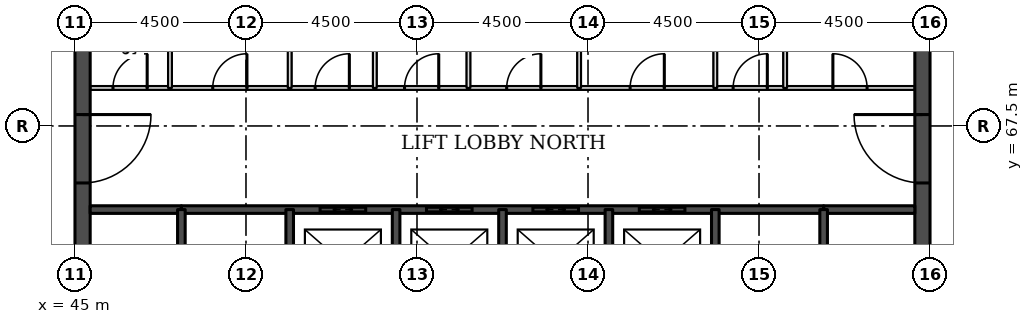
"""IFC4 building model, lengths in metres.
Left out: names, types, materials, properties, quantities, classifications, styles, units other than length and angle.
Written with IfcOpenShell. Run it as: python <this file> out.ifc"""

import sys

from ifc_helpers import new_model, si_unit, direction, frame, frame_2d, origin, place, context, subcontext, project, spatial, rectangle, extrude, element, fill, save


model = new_model("IFC4")
c1 = context("Model", 3, precision=1e-05, world=origin(), true_north=direction((0.0, 1.0)))
c2 = subcontext(c1, "Body", "Model", "MODEL_VIEW")
j1 = project(units=[si_unit("LENGTHUNIT", "METRE"), si_unit("PLANEANGLEUNIT", "RADIAN")], contexts=[c1])
p1 = place(None, origin())
s1 = spatial("IfcSite", under=j1, at=p1, CompositionType="ELEMENT")
p2 = place(p1, origin())
s2 = spatial("IfcBuilding", under=s1, at=p2, CompositionType="ELEMENT")
p3 = place(p2, frame((0.0, 0.0, 166.2)))
s3 = spatial("IfcBuildingStorey", under=s2, at=p3, CompositionType="ELEMENT", Elevation=166.2)
p4 = place(p3, frame((45.2, 49.5, 0.0), z_axis=(0.0, 0.0, 1.0), x_axis=(0.0, 1.0, 0.0)))
e1 = element("IfcWall", 1, at=p4, inside=s3, PredefinedType="SHEAR", context=c2, shape_type="SweptSolid", body=[
    extrude(rectangle(XDim=22.5, YDim=0.4, at=frame_2d((11.25, 0.0))), origin(), (0.0, 0.0, 1.0), 3.7),
])
p5 = place(p4, frame((4.2, 0.0, 0.0)))
e2 = element("IfcOpeningElement", 2, at=p5, cuts=e1, PredefinedType="OPENING", context=c2, shape_type="SweptSolid", body=[
    extrude(rectangle(XDim=1.8, YDim=2.1, at=frame_2d((0.9, 1.05))), frame((0.0, 0.21, 0.0), z_axis=(0.0, -1.0, 0.0), x_axis=(1.0, 0.0, 0.0)), (0.0, 0.0, 1.0), 0.42),
])
p6 = place(p4, frame((6.9, 0.0, 0.0)))
e3 = element("IfcOpeningElement", 3, at=p6, cuts=e1, PredefinedType="OPENING", context=c2, shape_type="SweptSolid", body=[
    extrude(rectangle(XDim=1.1, YDim=2.1, at=frame_2d((0.55, 1.05))), frame((0.0, 0.21, 0.0), z_axis=(0.0, -1.0, 0.0), x_axis=(1.0, 0.0, 0.0)), (0.0, 0.0, 1.0), 0.42),
])
p7 = place(p4, frame((13.6, 0.0, 0.0)))
e4 = element("IfcOpeningElement", 4, at=p7, cuts=e1, PredefinedType="OPENING", context=c2, shape_type="SweptSolid", body=[
    extrude(rectangle(XDim=1.1, YDim=2.1, at=frame_2d((0.55, 1.05))), frame((0.0, 0.21, 0.0), z_axis=(0.0, -1.0, 0.0), x_axis=(1.0, 0.0, 0.0)), (0.0, 0.0, 1.0), 0.42),
])
p8 = place(p4, frame((16.5, 0.0, 0.0)))
e5 = element("IfcOpeningElement", 5, at=p8, cuts=e1, PredefinedType="OPENING", context=c2, shape_type="SweptSolid", body=[
    extrude(rectangle(XDim=1.8, YDim=2.1, at=frame_2d((0.9, 1.05))), frame((0.0, 0.21, 0.0), z_axis=(0.0, -1.0, 0.0), x_axis=(1.0, 0.0, 0.0)), (0.0, 0.0, 1.0), 0.42),
])
p9 = place(p3, frame((67.3, 49.5, 0.0), z_axis=(0.0, 0.0, 1.0), x_axis=(0.0, 1.0, 0.0)))
e6 = element("IfcWall", 6, at=p9, inside=s3, PredefinedType="SHEAR", context=c2, shape_type="SweptSolid", body=[
    extrude(rectangle(XDim=22.5, YDim=0.4, at=frame_2d((11.25, 0.0))), origin(), (0.0, 0.0, 1.0), 3.7),
])
p10 = place(p9, frame((4.2, 0.0, 0.0)))
e7 = element("IfcOpeningElement", 7, at=p10, cuts=e6, PredefinedType="OPENING", context=c2, shape_type="SweptSolid", body=[
    extrude(rectangle(XDim=1.8, YDim=2.1, at=frame_2d((0.9, 1.05))), frame((0.0, 0.21, 0.0), z_axis=(0.0, -1.0, 0.0), x_axis=(1.0, 0.0, 0.0)), (0.0, 0.0, 1.0), 0.42),
])
p11 = place(p9, frame((6.9, 0.0, 0.0)))
e8 = element("IfcOpeningElement", 8, at=p11, cuts=e6, PredefinedType="OPENING", context=c2, shape_type="SweptSolid", body=[
    extrude(rectangle(XDim=1.1, YDim=2.1, at=frame_2d((0.55, 1.05))), frame((0.0, 0.21, 0.0), z_axis=(0.0, -1.0, 0.0), x_axis=(1.0, 0.0, 0.0)), (0.0, 0.0, 1.0), 0.42),
])
p12 = place(p9, frame((13.6, 0.0, 0.0)))
e9 = element("IfcOpeningElement", 9, at=p12, cuts=e6, PredefinedType="OPENING", context=c2, shape_type="SweptSolid", body=[
    extrude(rectangle(XDim=1.1, YDim=2.1, at=frame_2d((0.55, 1.05))), frame((0.0, 0.21, 0.0), z_axis=(0.0, -1.0, 0.0), x_axis=(1.0, 0.0, 0.0)), (0.0, 0.0, 1.0), 0.42),
])
p13 = place(p9, frame((16.5, 0.0, 0.0)))
e10 = element("IfcOpeningElement", 10, at=p13, cuts=e6, PredefinedType="OPENING", context=c2, shape_type="SweptSolid", body=[
    extrude(rectangle(XDim=1.8, YDim=2.1, at=frame_2d((0.9, 1.05))), frame((0.0, 0.21, 0.0), z_axis=(0.0, -1.0, 0.0), x_axis=(1.0, 0.0, 0.0)), (0.0, 0.0, 1.0), 0.42),
])
for number, where, z_axis, x_axis in (
    (11, (45.4, 65.3, 0.0), (0.0, 0.0, 1.0), (1.0, 0.0, 0.0)),
    (12, (64.7, 65.3, 0.0), (0.0, 0.0, 1.0), (1.0, 0.0, 0.0)),
):
    element("IfcWall", number, at=place(p3, frame(where, z_axis=z_axis, x_axis=x_axis)), inside=s3, PredefinedType="SOLIDWALL", context=c2, shape_type="SweptSolid", body=[
        extrude(rectangle(XDim=2.4, YDim=0.2, at=frame_2d((1.2, 0.0))), origin(), (0.0, 0.0, 1.0), 3.55),
    ])
p14 = place(p3, frame((47.8, 65.3, 0.0), z_axis=(0.0, 0.0, 1.0), x_axis=(1.0, 0.0, 0.0)))
e13 = element("IfcWall", 13, at=p14, inside=s3, PredefinedType="SOLIDWALL", context=c2, shape_type="SweptSolid", body=[
    extrude(rectangle(XDim=16.9, YDim=0.2, at=frame_2d((8.45, 0.0))), origin(), (0.0, 0.0, 1.0), 3.55),
])
p15 = place(p14, frame((3.65, 0.0, 0.0)))
e14 = element("IfcOpeningElement", 14, at=p15, cuts=e13, PredefinedType="OPENING", context=c2, shape_type="SweptSolid", body=[
    extrude(rectangle(XDim=1.2, YDim=2.1, at=frame_2d((0.6, 1.05))), frame((0.0, 0.11, 0.0), z_axis=(0.0, -1.0, 0.0), x_axis=(1.0, 0.0, 0.0)), (0.0, 0.0, 1.0), 0.22),
])
p16 = place(p14, frame((6.45, 0.0, 0.0)))
e15 = element("IfcOpeningElement", 15, at=p16, cuts=e13, PredefinedType="OPENING", context=c2, shape_type="SweptSolid", body=[
    extrude(rectangle(XDim=1.2, YDim=2.1, at=frame_2d((0.6, 1.05))), frame((0.0, 0.11, 0.0), z_axis=(0.0, -1.0, 0.0), x_axis=(1.0, 0.0, 0.0)), (0.0, 0.0, 1.0), 0.22),
])
p17 = place(p14, frame((9.25, 0.0, 0.0)))
e16 = element("IfcOpeningElement", 16, at=p17, cuts=e13, PredefinedType="OPENING", context=c2, shape_type="SweptSolid", body=[
    extrude(rectangle(XDim=1.2, YDim=2.1, at=frame_2d((0.6, 1.05))), frame((0.0, 0.11, 0.0), z_axis=(0.0, -1.0, 0.0), x_axis=(1.0, 0.0, 0.0)), (0.0, 0.0, 1.0), 0.22),
])
p18 = place(p14, frame((12.05, 0.0, 0.0)))
e17 = element("IfcOpeningElement", 17, at=p18, cuts=e13, PredefinedType="OPENING", context=c2, shape_type="SweptSolid", body=[
    extrude(rectangle(XDim=1.2, YDim=2.1, at=frame_2d((0.6, 1.05))), frame((0.0, 0.11, 0.0), z_axis=(0.0, -1.0, 0.0), x_axis=(1.0, 0.0, 0.0)), (0.0, 0.0, 1.0), 0.22),
])
p19 = place(p3, frame((45.4, 68.5, 0.0), z_axis=(0.0, 0.0, 1.0), x_axis=(1.0, 0.0, 0.0)))
e18 = element("IfcWall", 18, at=p19, inside=s3, PredefinedType="PARTITIONING", context=c2, shape_type="SweptSolid", body=[
    extrude(rectangle(XDim=21.7, YDim=0.1, at=frame_2d((10.85, 0.0))), origin(), (0.0, 0.0, 1.0), 3.55),
])
p20 = place(p19, frame((19.544, 0.0, 0.0)))
e19 = element("IfcOpeningElement", 19, at=p20, cuts=e18, PredefinedType="OPENING", context=c2, shape_type="SweptSolid", body=[
    extrude(rectangle(XDim=0.9, YDim=2.1, at=frame_2d((0.45, 1.05))), frame((0.0, 0.06, 0.0), z_axis=(0.0, -1.0, 0.0), x_axis=(1.0, 0.0, 0.0)), (0.0, 0.0, 1.0), 0.12),
])
p21 = place(p19, frame((16.919, 0.0, 0.0)))
e20 = element("IfcOpeningElement", 20, at=p21, cuts=e18, PredefinedType="OPENING", context=c2, shape_type="SweptSolid", body=[
    extrude(rectangle(XDim=0.9, YDim=2.1, at=frame_2d((0.45, 1.05))), frame((0.0, 0.06, 0.0), z_axis=(0.0, -1.0, 0.0), x_axis=(1.0, 0.0, 0.0)), (0.0, 0.0, 1.0), 0.12),
])
p22 = place(p19, frame((0.6, 0.0, 0.0)))
e21 = element("IfcOpeningElement", 21, at=p22, cuts=e18, PredefinedType="OPENING", context=c2, shape_type="SweptSolid", body=[
    extrude(rectangle(XDim=0.9, YDim=2.1, at=frame_2d((0.45, 1.05))), frame((0.0, 0.06, 0.0), z_axis=(0.0, -1.0, 0.0), x_axis=(1.0, 0.0, 0.0)), (0.0, 0.0, 1.0), 0.12),
])
p23 = place(p19, frame((3.225, 0.0, 0.0)))
e22 = element("IfcOpeningElement", 22, at=p23, cuts=e18, PredefinedType="OPENING", context=c2, shape_type="SweptSolid", body=[
    extrude(rectangle(XDim=0.9, YDim=2.1, at=frame_2d((0.45, 1.05))), frame((0.0, 0.06, 0.0), z_axis=(0.0, -1.0, 0.0), x_axis=(1.0, 0.0, 0.0)), (0.0, 0.0, 1.0), 0.12),
])
p24 = place(p19, frame((14.208, 0.0, 0.0)))
e23 = element("IfcOpeningElement", 23, at=p24, cuts=e18, PredefinedType="OPENING", context=c2, shape_type="SweptSolid", body=[
    extrude(rectangle(XDim=0.9, YDim=2.1, at=frame_2d((0.45, 1.05))), frame((0.0, 0.06, 0.0), z_axis=(0.0, -1.0, 0.0), x_axis=(1.0, 0.0, 0.0)), (0.0, 0.0, 1.0), 0.12),
])
p25 = place(p19, frame((10.96, 0.0, 0.0)))
e24 = element("IfcOpeningElement", 24, at=p25, cuts=e18, PredefinedType="OPENING", context=c2, shape_type="SweptSolid", body=[
    extrude(rectangle(XDim=0.9, YDim=2.1, at=frame_2d((0.45, 1.05))), frame((0.0, 0.06, 0.0), z_axis=(0.0, -1.0, 0.0), x_axis=(1.0, 0.0, 0.0)), (0.0, 0.0, 1.0), 0.12),
])
p26 = place(p19, frame((8.272, 0.0, 0.0)))
e25 = element("IfcOpeningElement", 25, at=p26, cuts=e18, PredefinedType="OPENING", context=c2, shape_type="SweptSolid", body=[
    extrude(rectangle(XDim=0.9, YDim=2.1, at=frame_2d((0.45, 1.05))), frame((0.0, 0.06, 0.0), z_axis=(0.0, -1.0, 0.0), x_axis=(1.0, 0.0, 0.0)), (0.0, 0.0, 1.0), 0.12),
])
p27 = place(p19, frame((5.92, 0.0, 0.0)))
e26 = element("IfcOpeningElement", 26, at=p27, cuts=e18, PredefinedType="OPENING", context=c2, shape_type="SweptSolid", body=[
    extrude(rectangle(XDim=0.9, YDim=2.1, at=frame_2d((0.45, 1.05))), frame((0.0, 0.06, 0.0), z_axis=(0.0, -1.0, 0.0), x_axis=(1.0, 0.0, 0.0)), (0.0, 0.0, 1.0), 0.12),
])
p28 = place(p3, frame((47.5, 68.5, 0.0), z_axis=(0.0, 0.0, 1.0), x_axis=(0.0, 1.0, 0.0)))
e27 = element("IfcWall", 27, at=p28, inside=s3, PredefinedType="PARTITIONING", context=c2, shape_type="SweptSolid", body=[
    extrude(rectangle(XDim=3.1, YDim=0.1, at=frame_2d((1.55, 0.0))), origin(), (0.0, 0.0, 1.0), 3.55),
])
p29 = place(p3, frame((47.8, 62.0, 0.0), z_axis=(0.0, 0.0, 1.0), x_axis=(0.0, 1.0, 0.0)))
e28 = element("IfcWall", 28, at=p29, inside=s3, PredefinedType="SOLIDWALL", context=c2, shape_type="SweptSolid", body=[
    extrude(rectangle(XDim=3.3, YDim=0.2, at=frame_2d((1.65, 0.0))), origin(), (0.0, 0.0, 1.0), 3.55),
])
p30 = place(p29, frame((1.1, 0.0, 0.0)))
e29 = element("IfcOpeningElement", 29, at=p30, cuts=e28, PredefinedType="OPENING", context=c2, shape_type="SweptSolid", body=[
    extrude(rectangle(XDim=1.1, YDim=2.1, at=frame_2d((0.55, 1.05))), frame((0.0, 0.11, 0.0), z_axis=(0.0, -1.0, 0.0), x_axis=(1.0, 0.0, 0.0)), (0.0, 0.0, 1.0), 0.22),
])
p31 = place(p3, frame((50.65, 68.5, 0.0), z_axis=(0.0, 0.0, 1.0), x_axis=(0.0, 1.0, 0.0)))
e30 = element("IfcWall", 30, at=p31, inside=s3, PredefinedType="PARTITIONING", context=c2, shape_type="SweptSolid", body=[
    extrude(rectangle(XDim=3.1, YDim=0.1, at=frame_2d((1.55, 0.0))), origin(), (0.0, 0.0, 1.0), 3.55),
])
p32 = place(p3, frame((50.65, 62.0, 0.0), z_axis=(0.0, 0.0, 1.0), x_axis=(0.0, 1.0, 0.0)))
e31 = element("IfcWall", 31, at=p32, inside=s3, PredefinedType="SOLIDWALL", context=c2, shape_type="SweptSolid", body=[
    extrude(rectangle(XDim=3.3, YDim=0.2, at=frame_2d((1.65, 0.0))), origin(), (0.0, 0.0, 1.0), 3.55),
])
p33 = place(p3, frame((52.89, 68.5, 0.0), z_axis=(0.0, 0.0, 1.0), x_axis=(0.0, 1.0, 0.0)))
e32 = element("IfcWall", 32, at=p33, inside=s3, PredefinedType="PARTITIONING", context=c2, shape_type="SweptSolid", body=[
    extrude(rectangle(XDim=3.1, YDim=0.1, at=frame_2d((1.55, 0.0))), origin(), (0.0, 0.0, 1.0), 3.55),
])
p34 = place(p3, frame((53.45, 62.5, 0.0), z_axis=(0.0, 0.0, 1.0), x_axis=(0.0, 1.0, 0.0)))
e33 = element("IfcWall", 33, at=p34, inside=s3, PredefinedType="SOLIDWALL", context=c2, shape_type="SweptSolid", body=[
    extrude(rectangle(XDim=2.8, YDim=0.2, at=frame_2d((1.4, 0.0))), origin(), (0.0, 0.0, 1.0), 3.55),
])
p35 = place(p3, frame((55.354, 68.5, 0.0), z_axis=(0.0, 0.0, 1.0), x_axis=(0.0, 1.0, 0.0)))
e34 = element("IfcWall", 34, at=p35, inside=s3, PredefinedType="PARTITIONING", context=c2, shape_type="SweptSolid", body=[
    extrude(rectangle(XDim=3.1, YDim=0.1, at=frame_2d((1.55, 0.0))), origin(), (0.0, 0.0, 1.0), 3.55),
])
p36 = place(p3, frame((56.25, 62.5, 0.0), z_axis=(0.0, 0.0, 1.0), x_axis=(0.0, 1.0, 0.0)))
e35 = element("IfcWall", 35, at=p36, inside=s3, PredefinedType="SOLIDWALL", context=c2, shape_type="SweptSolid", body=[
    extrude(rectangle(XDim=2.8, YDim=0.2, at=frame_2d((1.4, 0.0))), origin(), (0.0, 0.0, 1.0), 3.55),
])
p37 = place(p3, frame((58.266, 68.5, 0.0), z_axis=(0.0, 0.0, 1.0), x_axis=(0.0, 1.0, 0.0)))
e36 = element("IfcWall", 36, at=p37, inside=s3, PredefinedType="PARTITIONING", context=c2, shape_type="SweptSolid", body=[
    extrude(rectangle(XDim=3.1, YDim=0.1, at=frame_2d((1.55, 0.0))), origin(), (0.0, 0.0, 1.0), 3.55),
])
p38 = place(p3, frame((59.05, 62.5, 0.0), z_axis=(0.0, 0.0, 1.0), x_axis=(0.0, 1.0, 0.0)))
e37 = element("IfcWall", 37, at=p38, inside=s3, PredefinedType="SOLIDWALL", context=c2, shape_type="SweptSolid", body=[
    extrude(rectangle(XDim=2.8, YDim=0.2, at=frame_2d((1.4, 0.0))), origin(), (0.0, 0.0, 1.0), 3.55),
])
p39 = place(p3, frame((61.85, 68.5, 0.0), z_axis=(0.0, 0.0, 1.0), x_axis=(0.0, 1.0, 0.0)))
e38 = element("IfcWall", 38, at=p39, inside=s3, PredefinedType="PARTITIONING", context=c2, shape_type="SweptSolid", body=[
    extrude(rectangle(XDim=3.1, YDim=0.1, at=frame_2d((1.55, 0.0))), origin(), (0.0, 0.0, 1.0), 3.55),
])
p40 = place(p3, frame((61.85, 62.0, 0.0), z_axis=(0.0, 0.0, 1.0), x_axis=(0.0, 1.0, 0.0)))
e39 = element("IfcWall", 39, at=p40, inside=s3, PredefinedType="SOLIDWALL", context=c2, shape_type="SweptSolid", body=[
    extrude(rectangle(XDim=3.3, YDim=0.2, at=frame_2d((1.65, 0.0))), origin(), (0.0, 0.0, 1.0), 3.55),
])
p41 = place(p3, frame((63.688, 68.5, 0.0), z_axis=(0.0, 0.0, 1.0), x_axis=(0.0, 1.0, 0.0)))
e40 = element("IfcWall", 40, at=p41, inside=s3, PredefinedType="PARTITIONING", context=c2, shape_type="SweptSolid", body=[
    extrude(rectangle(XDim=3.1, YDim=0.1, at=frame_2d((1.55, 0.0))), origin(), (0.0, 0.0, 1.0), 3.55),
])
p42 = place(p3, frame((64.7, 62.0, 0.0), z_axis=(0.0, 0.0, 1.0), x_axis=(0.0, 1.0, 0.0)))
e41 = element("IfcWall", 41, at=p42, inside=s3, PredefinedType="SOLIDWALL", context=c2, shape_type="SweptSolid", body=[
    extrude(rectangle(XDim=3.3, YDim=0.2, at=frame_2d((1.65, 0.0))), origin(), (0.0, 0.0, 1.0), 3.55),
])
p43 = place(p42, frame((1.1, 0.0, 0.0)))
e42 = element("IfcOpeningElement", 42, at=p43, cuts=e41, PredefinedType="OPENING", context=c2, shape_type="SweptSolid", body=[
    extrude(rectangle(XDim=1.1, YDim=2.1, at=frame_2d((0.55, 1.05))), frame((0.0, 0.11, 0.0), z_axis=(0.0, -1.0, 0.0), x_axis=(1.0, 0.0, 0.0)), (0.0, 0.0, 1.0), 0.22),
])
p44 = place(p15, origin())
e43 = element("IfcDoor", 43, at=p44, inside=s3, OperationType="DOUBLE_DOOR_SLIDING", PredefinedType="DOOR", context=c2, shape_type="SweptSolid", body=[
    extrude(rectangle(XDim=1.2, YDim=2.1, at=frame_2d((0.6, 1.05))), frame((0.0, 0.025, 0.0), z_axis=(0.0, -1.0, 0.0), x_axis=(1.0, 0.0, 0.0)), (0.0, 0.0, 1.0), 0.05),
])
fill(e14, e43)
p45 = place(p16, origin())
e44 = element("IfcDoor", 44, at=p45, inside=s3, OperationType="DOUBLE_DOOR_SLIDING", PredefinedType="DOOR", context=c2, shape_type="SweptSolid", body=[
    extrude(rectangle(XDim=1.2, YDim=2.1, at=frame_2d((0.6, 1.05))), frame((0.0, 0.025, 0.0), z_axis=(0.0, -1.0, 0.0), x_axis=(1.0, 0.0, 0.0)), (0.0, 0.0, 1.0), 0.05),
])
fill(e15, e44)
p46 = place(p17, origin())
e45 = element("IfcDoor", 45, at=p46, inside=s3, OperationType="DOUBLE_DOOR_SLIDING", PredefinedType="DOOR", context=c2, shape_type="SweptSolid", body=[
    extrude(rectangle(XDim=1.2, YDim=2.1, at=frame_2d((0.6, 1.05))), frame((0.0, 0.025, 0.0), z_axis=(0.0, -1.0, 0.0), x_axis=(1.0, 0.0, 0.0)), (0.0, 0.0, 1.0), 0.05),
])
fill(e16, e45)
p47 = place(p18, origin())
e46 = element("IfcDoor", 46, at=p47, inside=s3, OperationType="DOUBLE_DOOR_SLIDING", PredefinedType="DOOR", context=c2, shape_type="SweptSolid", body=[
    extrude(rectangle(XDim=1.2, YDim=2.1, at=frame_2d((0.6, 1.05))), frame((0.0, 0.025, 0.0), z_axis=(0.0, -1.0, 0.0), x_axis=(1.0, 0.0, 0.0)), (0.0, 0.0, 1.0), 0.05),
])
fill(e17, e46)
p48 = place(p8, frame((1.8, 0.0, 0.0), z_axis=(0.0, 0.0, 1.0), x_axis=(-1.0, 0.0, 0.0)))
e47 = element("IfcDoor", 47, at=p48, inside=s3, OperationType="SINGLE_SWING_LEFT", PredefinedType="DOOR", context=c2, shape_type="SweptSolid", body=[
    extrude(rectangle(XDim=1.8, YDim=2.1, at=frame_2d((0.9, 1.05))), frame((0.0, 0.025, 0.0), z_axis=(0.0, -1.0, 0.0), x_axis=(1.0, 0.0, 0.0)), (0.0, 0.0, 1.0), 0.05),
])
fill(e5, e47)
p49 = place(p13, origin())
e48 = element("IfcDoor", 48, at=p49, inside=s3, OperationType="SINGLE_SWING_RIGHT", PredefinedType="DOOR", context=c2, shape_type="SweptSolid", body=[
    extrude(rectangle(XDim=1.8, YDim=2.1, at=frame_2d((0.9, 1.05))), frame((0.0, 0.025, 0.0), z_axis=(0.0, -1.0, 0.0), x_axis=(1.0, 0.0, 0.0)), (0.0, 0.0, 1.0), 0.05),
])
fill(e10, e48)
p50 = place(p20, origin())
e49 = element("IfcDoor", 49, at=p50, inside=s3, OperationType="SINGLE_SWING_LEFT", PredefinedType="DOOR", context=c2, shape_type="SweptSolid", body=[
    extrude(rectangle(XDim=0.9, YDim=2.1, at=frame_2d((0.45, 1.05))), frame((0.0, 0.025, 0.0), z_axis=(0.0, -1.0, 0.0), x_axis=(1.0, 0.0, 0.0)), (0.0, 0.0, 1.0), 0.05),
])
fill(e19, e49)
p51 = place(p21, origin())
e50 = element("IfcDoor", 50, at=p51, inside=s3, OperationType="SINGLE_SWING_RIGHT", PredefinedType="DOOR", context=c2, shape_type="SweptSolid", body=[
    extrude(rectangle(XDim=0.9, YDim=2.1, at=frame_2d((0.45, 1.05))), frame((0.0, 0.025, 0.0), z_axis=(0.0, -1.0, 0.0), x_axis=(1.0, 0.0, 0.0)), (0.0, 0.0, 1.0), 0.05),
])
fill(e20, e50)
p52 = place(p22, origin())
e51 = element("IfcDoor", 51, at=p52, inside=s3, OperationType="SINGLE_SWING_RIGHT", PredefinedType="DOOR", context=c2, shape_type="SweptSolid", body=[
    extrude(rectangle(XDim=0.9, YDim=2.1, at=frame_2d((0.45, 1.05))), frame((0.0, 0.025, 0.0), z_axis=(0.0, -1.0, 0.0), x_axis=(1.0, 0.0, 0.0)), (0.0, 0.0, 1.0), 0.05),
])
fill(e21, e51)
p53 = place(p23, origin())
e52 = element("IfcDoor", 52, at=p53, inside=s3, OperationType="SINGLE_SWING_RIGHT", PredefinedType="DOOR", context=c2, shape_type="SweptSolid", body=[
    extrude(rectangle(XDim=0.9, YDim=2.1, at=frame_2d((0.45, 1.05))), frame((0.0, 0.025, 0.0), z_axis=(0.0, -1.0, 0.0), x_axis=(1.0, 0.0, 0.0)), (0.0, 0.0, 1.0), 0.05),
])
fill(e22, e52)
p54 = place(p24, origin())
e53 = element("IfcDoor", 53, at=p54, inside=s3, OperationType="SINGLE_SWING_RIGHT", PredefinedType="DOOR", context=c2, shape_type="SweptSolid", body=[
    extrude(rectangle(XDim=0.9, YDim=2.1, at=frame_2d((0.45, 1.05))), frame((0.0, 0.025, 0.0), z_axis=(0.0, -1.0, 0.0), x_axis=(1.0, 0.0, 0.0)), (0.0, 0.0, 1.0), 0.05),
])
fill(e23, e53)
p55 = place(p25, origin())
e54 = element("IfcDoor", 54, at=p55, inside=s3, OperationType="SINGLE_SWING_RIGHT", PredefinedType="DOOR", context=c2, shape_type="SweptSolid", body=[
    extrude(rectangle(XDim=0.9, YDim=2.1, at=frame_2d((0.45, 1.05))), frame((0.0, 0.025, 0.0), z_axis=(0.0, -1.0, 0.0), x_axis=(1.0, 0.0, 0.0)), (0.0, 0.0, 1.0), 0.05),
])
fill(e24, e54)
p56 = place(p26, origin())
e55 = element("IfcDoor", 55, at=p56, inside=s3, OperationType="SINGLE_SWING_RIGHT", PredefinedType="DOOR", context=c2, shape_type="SweptSolid", body=[
    extrude(rectangle(XDim=0.9, YDim=2.1, at=frame_2d((0.45, 1.05))), frame((0.0, 0.025, 0.0), z_axis=(0.0, -1.0, 0.0), x_axis=(1.0, 0.0, 0.0)), (0.0, 0.0, 1.0), 0.05),
])
fill(e25, e55)
p57 = place(p27, origin())
e56 = element("IfcDoor", 56, at=p57, inside=s3, OperationType="SINGLE_SWING_RIGHT", PredefinedType="DOOR", context=c2, shape_type="SweptSolid", body=[
    extrude(rectangle(XDim=0.9, YDim=2.1, at=frame_2d((0.45, 1.05))), frame((0.0, 0.025, 0.0), z_axis=(0.0, -1.0, 0.0), x_axis=(1.0, 0.0, 0.0)), (0.0, 0.0, 1.0), 0.05),
])
fill(e26, e56)
save(model, sys.argv[1])
